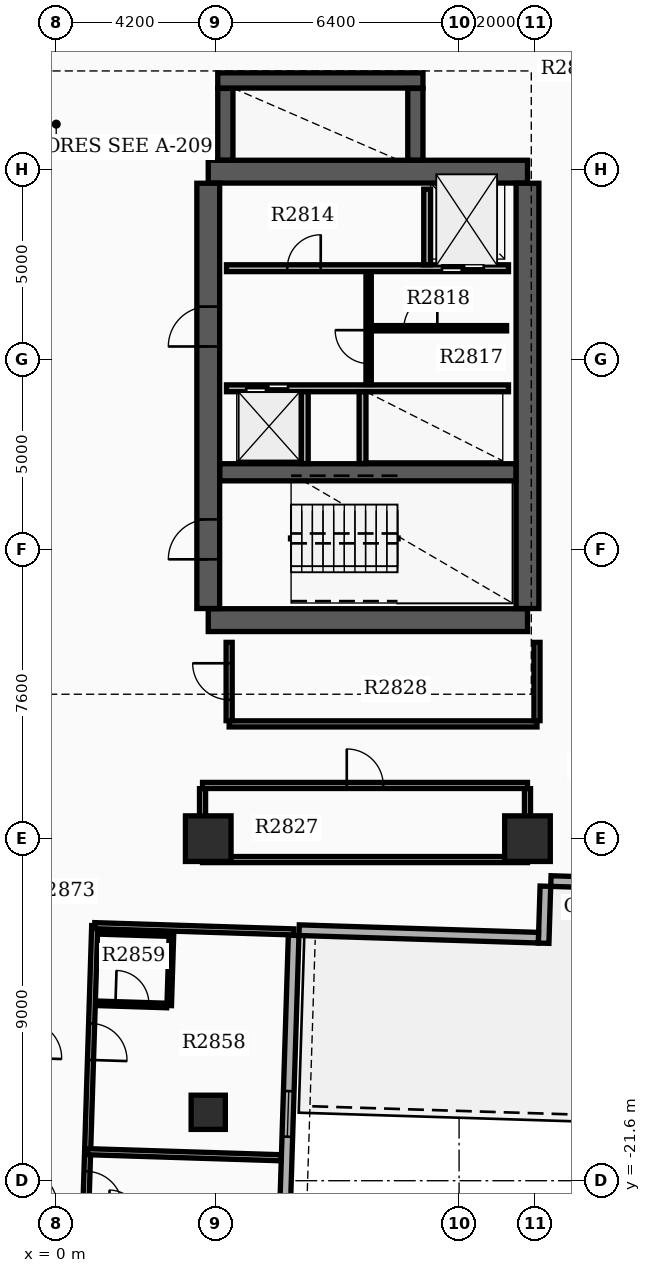
"""IFC4 building model, lengths in metres.
Left out: names, types, materials, properties, quantities, classifications, styles, units other than length and angle.
Written with IfcOpenShell. Run it as: python <this file> out.ifc"""

import sys

from ifc_helpers import new_model, si_unit, direction, frame, frame_2d, origin, origin_2d, place, context, subcontext, project, spatial, rectangle, extrude, element, fill, save


model = new_model("IFC4")
c1 = context("Model", 3, precision=1e-05, world=origin(), true_north=direction((0.0, 1.0)))
c2 = subcontext(c1, "Body", "Model", "MODEL_VIEW")
j1 = project(units=[si_unit("LENGTHUNIT", "METRE"), si_unit("PLANEANGLEUNIT", "RADIAN")], contexts=[c1])
p1 = place(None, origin())
s1 = spatial("IfcSite", under=j1, at=p1, CompositionType="ELEMENT")
p2 = place(p1, origin())
s2 = spatial("IfcBuilding", under=s1, at=p2, CompositionType="ELEMENT")
p3 = place(p2, frame((0.0, 0.0, 176.1)))
s3 = spatial("IfcBuildingStorey", under=s2, at=p3, CompositionType="ELEMENT", Elevation=176.1)
for number, where, z_axis, x_axis in (
    (1, (4.0, -6.85, 0.0), (0.0, 0.0, 1.0), (1.0, 0.0, 0.0)),
    (2, (4.0, 4.95, 0.0), (0.0, 0.0, 1.0), (1.0, 0.0, 0.0)),
):
    element("IfcWall", number, at=place(p3, frame(where, z_axis=z_axis, x_axis=x_axis)), inside=s3, PredefinedType="SHEAR", context=c2, shape_type="SweptSolid", body=[
        extrude(rectangle(XDim=8.4, YDim=0.6, at=frame_2d((4.2, 0.0))), origin(), (0.0, 0.0, 1.0), 3.7),
    ])
p4 = place(p3, frame((4.0, -6.545, 0.0), z_axis=(0.0, 0.0, 1.0), x_axis=(0.0, 1.0, 0.0)))
e3 = element("IfcWall", 3, at=p4, inside=s3, PredefinedType="SHEAR", context=c2, shape_type="SweptSolid", body=[
    extrude(rectangle(XDim=11.19, YDim=0.6, at=frame_2d((5.595, 0.0))), origin(), (0.0, 0.0, 1.0), 3.7),
])
p5 = place(p4, frame((1.295, 0.0, 0.0)))
e4 = element("IfcOpeningElement", 4, at=p5, cuts=e3, PredefinedType="OPENING", context=c2, shape_type="SweptSolid", body=[
    extrude(rectangle(XDim=1.05, YDim=2.15, at=frame_2d((0.525, 1.075))), frame((0.0, 0.31, 0.0), z_axis=(0.0, -1.0, 0.0), x_axis=(1.0, 0.0, 0.0)), (0.0, 0.0, 1.0), 0.62),
])
p6 = place(p4, frame((6.895, 0.0, 0.0)))
e5 = element("IfcOpeningElement", 5, at=p6, cuts=e3, PredefinedType="OPENING", context=c2, shape_type="SweptSolid", body=[
    extrude(rectangle(XDim=1.05, YDim=2.15, at=frame_2d((0.525, 1.075))), frame((0.0, 0.31, 0.0), z_axis=(0.0, -1.0, 0.0), x_axis=(1.0, 0.0, 0.0)), (0.0, 0.0, 1.0), 0.62),
])
p7 = place(p3, frame((12.4, -6.545, 0.0), z_axis=(0.0, 0.0, 1.0), x_axis=(0.0, 1.0, 0.0)))
e6 = element("IfcWall", 6, at=p7, inside=s3, PredefinedType="SHEAR", context=c2, shape_type="SweptSolid", body=[
    extrude(rectangle(XDim=11.19, YDim=0.6, at=frame_2d((5.595, 0.0))), origin(), (0.0, 0.0, 1.0), 3.7),
])
p8 = place(p3, frame((4.305, -2.96, 0.0), z_axis=(0.0, 0.0, 1.0), x_axis=(1.0, 0.0, 0.0)))
e7 = element("IfcWall", 7, at=p8, inside=s3, PredefinedType="SHEAR", context=c2, shape_type="SweptSolid", body=[
    extrude(rectangle(XDim=7.79, YDim=0.45, at=frame_2d((3.895, 0.0))), origin(), (0.0, 0.0, 1.0), 3.7),
])
p9 = place(p3, frame((4.45, 5.255, 0.0), z_axis=(0.0, 0.0, 1.0), x_axis=(0.0, 1.0, 0.0)))
e8 = element("IfcWall", 8, at=p9, inside=s3, PredefinedType="SHEAR", context=c2, shape_type="SweptSolid", body=[
    extrude(rectangle(XDim=1.885, YDim=0.4, at=frame_2d((0.942, 0.0))), origin(), (0.0, 0.0, 1.0), 3.7),
])
p10 = place(p3, frame((4.25, 7.35, 0.0), z_axis=(0.0, 0.0, 1.0), x_axis=(1.0, 0.0, 0.0)))
e9 = element("IfcWall", 9, at=p10, inside=s3, PredefinedType="SHEAR", context=c2, shape_type="SweptSolid", body=[
    extrude(rectangle(XDim=5.4, YDim=0.4, at=frame_2d((2.7, 0.0))), origin(), (0.0, 0.0, 1.0), 3.7),
])
p11 = place(p3, frame((9.45, 5.255, 0.0), z_axis=(0.0, 0.0, 1.0), x_axis=(0.0, 1.0, 0.0)))
e10 = element("IfcWall", 10, at=p11, inside=s3, PredefinedType="SHEAR", context=c2, shape_type="SweptSolid", body=[
    extrude(rectangle(XDim=1.885, YDim=0.4, at=frame_2d((0.942, 0.0))), origin(), (0.0, 0.0, 1.0), 3.7),
])
for number, where, z_axis, x_axis in (
    (11, (12.4, -12.6, 0.0), (0.0, 0.0, 1.0), (1.0, 0.0, 0.0)),
    (12, (4.0, -12.6, 0.0), (0.0, 0.0, 1.0), (1.0, 0.0, 0.0)),
):
    element("IfcColumn", number, at=place(p3, frame(where, z_axis=z_axis, x_axis=x_axis)), inside=s3, PredefinedType="COLUMN", context=c2, shape_type="SweptSolid", body=[
        extrude(rectangle(XDim=1.2, YDim=1.2, at=origin_2d()), origin(), (0.0, 0.0, 1.0), 3.9),
    ])
p12 = place(p3, frame((4.0, -19.8, 0.0), z_axis=(0.0, 0.0, 1.0), x_axis=(1.0, 0.0, 0.0)))
e13 = element("IfcColumn", 13, at=p12, inside=s3, PredefinedType="COLUMN", context=c2, shape_type="SweptSolid", body=[
    extrude(rectangle(XDim=0.9, YDim=0.9, at=origin_2d()), origin(), (0.0, 0.0, 1.0), 3.9),
])
p13 = place(p3, frame((5.616, -35.234, 0.0), z_axis=(0.0, 0.0, 1.0), x_axis=(0.031398187845, 0.999506955354, 0.0)))
e14 = element("IfcWall", 14, at=p13, inside=s3, PredefinedType="STANDARD", context=c2, shape_type="SweptSolid", body=[
    extrude(rectangle(XDim=20.1, YDim=0.28, at=frame_2d((10.05, 0.0))), origin(), (0.0, 0.0, 1.0), 2.97),
])
p14 = place(p13, frame((0.85, 0.0, 0.8)))
e15 = element("IfcOpeningElement", 15, at=p14, cuts=e14, PredefinedType="OPENING", context=c2, shape_type="SweptSolid", body=[
    extrude(rectangle(XDim=1.4, YDim=1.6, at=frame_2d((0.7, 0.8))), frame((0.0, 0.15, 0.0), z_axis=(0.0, -1.0, 0.0), x_axis=(1.0, 0.0, 0.0)), (0.0, 0.0, 1.0), 0.3),
])
p15 = place(p13, frame((4.05, 0.0, 0.8)))
e16 = element("IfcOpeningElement", 16, at=p15, cuts=e14, PredefinedType="OPENING", context=c2, shape_type="SweptSolid", body=[
    extrude(rectangle(XDim=1.4, YDim=1.6, at=frame_2d((0.7, 0.8))), frame((0.0, 0.15, 0.0), z_axis=(0.0, -1.0, 0.0), x_axis=(1.0, 0.0, 0.0)), (0.0, 0.0, 1.0), 0.3),
])
p16 = place(p13, frame((7.25, 0.0, 0.8)))
e17 = element("IfcOpeningElement", 17, at=p16, cuts=e14, PredefinedType="OPENING", context=c2, shape_type="SweptSolid", body=[
    extrude(rectangle(XDim=1.4, YDim=1.6, at=frame_2d((0.7, 0.8))), frame((0.0, 0.15, 0.0), z_axis=(0.0, -1.0, 0.0), x_axis=(1.0, 0.0, 0.0)), (0.0, 0.0, 1.0), 0.3),
])
p17 = place(p13, frame((10.95, 0.0, 0.8)))
e18 = element("IfcOpeningElement", 18, at=p17, cuts=e14, PredefinedType="OPENING", context=c2, shape_type="SweptSolid", body=[
    extrude(rectangle(XDim=1.4, YDim=1.6, at=frame_2d((0.7, 0.8))), frame((0.0, 0.15, 0.0), z_axis=(0.0, -1.0, 0.0), x_axis=(1.0, 0.0, 0.0)), (0.0, 0.0, 1.0), 0.3),
])
p18 = place(p13, frame((14.799, 0.0, 0.85)))
e19 = element("IfcOpeningElement", 19, at=p18, cuts=e14, PredefinedType="OPENING", context=c2, shape_type="SweptSolid", body=[
    extrude(rectangle(XDim=1.2, YDim=1.6, at=frame_2d((0.6, 0.8))), frame((0.0, 0.15, 0.0), z_axis=(0.0, -1.0, 0.0), x_axis=(1.0, 0.0, 0.0)), (0.0, 0.0, 1.0), 0.3),
])
p19 = place(p3, frame((14.235, -13.754, 0.0), z_axis=(0.0, 0.0, 1.0), x_axis=(-0.999506398264, 0.031415916822, 0.0)))
e20 = element("IfcWall", 20, at=p19, inside=s3, PredefinedType="STANDARD", context=c2, shape_type="SweptSolid", body=[
    extrude(rectangle(XDim=1.22, YDim=0.28, at=frame_2d((0.61, 0.0))), origin(), (0.0, 0.0, 1.0), 2.97),
])
p20 = place(p3, frame((12.871, -13.851, 0.0), z_axis=(0.0, 0.0, 1.0), x_axis=(-0.031412596484, -0.999506502621, 0.0)))
e21 = element("IfcWall", 21, at=p20, inside=s3, PredefinedType="STANDARD", context=c2, shape_type="SweptSolid", body=[
    extrude(rectangle(XDim=1.5, YDim=0.28, at=frame_2d((0.75, 0.0))), origin(), (0.0, 0.0, 1.0), 2.97),
])
p21 = place(p3, frame((12.689, -15.206, 0.0), z_axis=(0.0, 0.0, 1.0), x_axis=(-0.999507262922, 0.031388395416, 0.0)))
e22 = element("IfcWall", 22, at=p21, inside=s3, PredefinedType="STANDARD", context=c2, shape_type="SweptSolid", body=[
    extrude(rectangle(XDim=6.3, YDim=0.28, at=frame_2d((3.15, 0.0))), origin(), (0.0, 0.0, 1.0), 2.97),
])
p22 = place(p3, frame((4.48, 2.41, 0.0), z_axis=(0.0, 0.0, 1.0), x_axis=(1.0, 0.0, 0.0)))
e23 = element("IfcWall", 23, at=p22, inside=s3, PredefinedType="SOLIDWALL", context=c2, shape_type="SweptSolid", body=[
    extrude(rectangle(XDim=7.42, YDim=0.18, at=frame_2d((3.71, 0.0))), origin(), (0.0, 0.0, 1.0), 2.96),
])
p23 = place(p22, frame((5.67, 0.0, 0.0)))
e24 = element("IfcOpeningElement", 24, at=p23, cuts=e23, PredefinedType="OPENING", context=c2, shape_type="SweptSolid", body=[
    extrude(rectangle(XDim=1.1, YDim=2.15, at=frame_2d((0.55, 1.075))), frame((0.0, 0.1, 0.0), z_axis=(0.0, -1.0, 0.0), x_axis=(1.0, 0.0, 0.0)), (0.0, 0.0, 1.0), 0.2),
])
p24 = place(p22, frame((1.6, 0.0, 0.0)))
e25 = element("IfcOpeningElement", 25, at=p24, cuts=e23, PredefinedType="OPENING", context=c2, shape_type="SweptSolid", body=[
    extrude(rectangle(XDim=0.88, YDim=2.1, at=frame_2d((0.44, 1.05))), frame((0.0, 0.1, 0.0), z_axis=(0.0, -1.0, 0.0), x_axis=(1.0, 0.0, 0.0)), (0.0, 0.0, 1.0), 0.2),
])
p25 = place(p3, frame((4.48, -0.75, 0.0), z_axis=(0.0, 0.0, 1.0), x_axis=(1.0, 0.0, 0.0)))
e26 = element("IfcWall", 26, at=p25, inside=s3, PredefinedType="SOLIDWALL", context=c2, shape_type="SweptSolid", body=[
    extrude(rectangle(XDim=7.42, YDim=0.18, at=frame_2d((3.71, 0.0))), origin(), (0.0, 0.0, 1.0), 2.96),
])
p26 = place(p25, frame((0.52, 0.0, 0.0)))
e27 = element("IfcOpeningElement", 27, at=p26, cuts=e26, PredefinedType="OPENING", context=c2, shape_type="SweptSolid", body=[
    extrude(rectangle(XDim=1.1, YDim=2.15, at=frame_2d((0.55, 1.075))), frame((0.0, 0.1, 0.0), z_axis=(0.0, -1.0, 0.0), x_axis=(1.0, 0.0, 0.0)), (0.0, 0.0, 1.0), 0.2),
])
p27 = place(p3, frame((9.76, 2.5, 0.0), z_axis=(0.0, 0.0, 1.0), x_axis=(0.0, 1.0, 0.0)))
e28 = element("IfcWall", 28, at=p27, inside=s3, PredefinedType="SOLIDWALL", context=c2, shape_type="SweptSolid", body=[
    extrude(rectangle(XDim=1.99, YDim=0.18, at=frame_2d((0.995, 0.0))), origin(), (0.0, 0.0, 1.0), 2.96),
])
for number, where, z_axis, x_axis in (
    (29, (6.54, -2.73, 0.0), (0.0, 0.0, 1.0), (0.0, 1.0, 0.0)),
    (30, (8.06, -2.73, 0.0), (0.0, 0.0, 1.0), (0.0, 1.0, 0.0)),
):
    element("IfcWall", number, at=place(p3, frame(where, z_axis=z_axis, x_axis=x_axis)), inside=s3, PredefinedType="SOLIDWALL", context=c2, shape_type="SweptSolid", body=[
        extrude(rectangle(XDim=1.89, YDim=0.18, at=frame_2d((0.945, 0.0))), origin(), (0.0, 0.0, 1.0), 2.96),
    ])
p28 = place(p3, frame((8.22, -0.65, 0.0), z_axis=(0.0, 0.0, 1.0), x_axis=(0.0, 1.0, 0.0)))
e31 = element("IfcWall", 31, at=p28, inside=s3, PredefinedType="SOLIDWALL", context=c2, shape_type="SweptSolid", body=[
    extrude(rectangle(XDim=2.96, YDim=0.14, at=frame_2d((1.48, 0.0))), origin(), (0.0, 0.0, 1.0), 2.96),
])
p29 = place(p28, frame((0.55, 0.0, 0.0)))
e32 = element("IfcOpeningElement", 32, at=p29, cuts=e31, PredefinedType="OPENING", context=c2, shape_type="SweptSolid", body=[
    extrude(rectangle(XDim=0.88, YDim=2.1, at=frame_2d((0.44, 1.05))), frame((0.0, 0.08, 0.0), z_axis=(0.0, -1.0, 0.0), x_axis=(1.0, 0.0, 0.0)), (0.0, 0.0, 1.0), 0.16),
])
p30 = place(p3, frame((8.298, 0.83, 0.0), z_axis=(0.0, 0.0, 1.0), x_axis=(1.0, 0.0, 0.0)))
e33 = element("IfcWall", 33, at=p30, inside=s3, PredefinedType="PARTITIONING", context=c2, shape_type="SweptSolid", body=[
    extrude(rectangle(XDim=3.552, YDim=0.14, at=frame_2d((1.776, 0.0))), origin(), (0.0, 0.0, 1.0), 2.96),
])
p31 = place(p30, frame((0.85, 0.0, 0.0)))
e34 = element("IfcOpeningElement", 34, at=p31, cuts=e33, PredefinedType="OPENING", context=c2, shape_type="SweptSolid", body=[
    extrude(rectangle(XDim=0.88, YDim=2.1, at=frame_2d((0.44, 1.05))), frame((0.0, 0.08, 0.0), z_axis=(0.0, -1.0, 0.0), x_axis=(1.0, 0.0, 0.0)), (0.0, 0.0, 1.0), 0.16),
])
p32 = place(p3, frame((3.85, -13.15, 0.0), z_axis=(0.0, 0.0, 1.0), x_axis=(1.0, 0.0, 0.0)))
e35 = element("IfcWall", 35, at=p32, inside=s3, PredefinedType="PARTITIONING", context=c2, shape_type="SweptSolid", body=[
    extrude(rectangle(XDim=8.55, YDim=0.16, at=frame_2d((4.275, 0.0))), origin(), (0.0, 0.0, 1.0), 2.96),
])
p33 = place(p3, frame((3.85, -11.2, 0.0), z_axis=(0.0, 0.0, 1.0), x_axis=(1.0, 0.0, 0.0)))
e36 = element("IfcWall", 36, at=p33, inside=s3, PredefinedType="PARTITIONING", context=c2, shape_type="SweptSolid", body=[
    extrude(rectangle(XDim=8.55, YDim=0.16, at=frame_2d((4.275, 0.0))), origin(), (0.0, 0.0, 1.0), 2.96),
])
p34 = place(p33, frame((3.795, 0.0, 0.0)))
e37 = element("IfcOpeningElement", 37, at=p34, cuts=e36, PredefinedType="OPENING", context=c2, shape_type="SweptSolid", body=[
    extrude(rectangle(XDim=0.96, YDim=2.15, at=frame_2d((0.48, 1.075))), frame((0.0, 0.09, 0.0), z_axis=(0.0, -1.0, 0.0), x_axis=(1.0, 0.0, 0.0)), (0.0, 0.0, 1.0), 0.18),
])
for number, where, z_axis, x_axis in (
    (38, (3.85, -13.065, 0.0), (0.0, 0.0, 1.0), (0.0, 1.0, 0.0)),
    (39, (12.4, -13.065, 0.0), (0.0, 0.0, 1.0), (0.0, 1.0, 0.0)),
):
    element("IfcWall", number, at=place(p3, frame(where, z_axis=z_axis, x_axis=x_axis)), inside=s3, PredefinedType="PARTITIONING", context=c2, shape_type="SweptSolid", body=[
        extrude(rectangle(XDim=1.78, YDim=0.16, at=frame_2d((0.89, 0.0))), origin(), (0.0, 0.0, 1.0), 2.96),
    ])
p35 = place(p3, frame((4.55, -9.58, 0.0), z_axis=(0.0, 0.0, 1.0), x_axis=(1.0, 0.0, 0.0)))
e40 = element("IfcWall", 40, at=p35, inside=s3, PredefinedType="PARTITIONING", context=c2, shape_type="SweptSolid", body=[
    extrude(rectangle(XDim=8.1, YDim=0.16, at=frame_2d((4.05, 0.0))), origin(), (0.0, 0.0, 1.0), 2.96),
])
p36 = place(p3, frame((4.55, -9.495, 0.0), z_axis=(0.0, 0.0, 1.0), x_axis=(0.0, 1.0, 0.0)))
e41 = element("IfcWall", 41, at=p36, inside=s3, PredefinedType="PARTITIONING", context=c2, shape_type="SweptSolid", body=[
    extrude(rectangle(XDim=2.06, YDim=0.16, at=frame_2d((1.03, 0.0))), origin(), (0.0, 0.0, 1.0), 2.96),
])
p37 = place(p36, frame((0.55, 0.0, 0.0)))
e42 = element("IfcOpeningElement", 42, at=p37, cuts=e41, PredefinedType="OPENING", context=c2, shape_type="SweptSolid", body=[
    extrude(rectangle(XDim=0.96, YDim=2.15, at=frame_2d((0.48, 1.075))), frame((0.0, 0.09, 0.0), z_axis=(0.0, -1.0, 0.0), x_axis=(1.0, 0.0, 0.0)), (0.0, 0.0, 1.0), 0.18),
])
p38 = place(p3, frame((12.65, -9.495, 0.0), z_axis=(0.0, 0.0, 1.0), x_axis=(0.0, 1.0, 0.0)))
e43 = element("IfcWall", 43, at=p38, inside=s3, PredefinedType="PARTITIONING", context=c2, shape_type="SweptSolid", body=[
    extrude(rectangle(XDim=2.06, YDim=0.16, at=frame_2d((1.03, 0.0))), origin(), (0.0, 0.0, 1.0), 2.96),
])
p39 = place(p3, frame((1.013, -14.889, 0.0), z_axis=(0.0, 0.0, 1.0), x_axis=(-0.031410762168, -0.999506560269, 0.0)))
e44 = element("IfcWall", 44, at=p39, inside=s3, PredefinedType="PARTITIONING", context=c2, shape_type="SweptSolid", body=[
    extrude(rectangle(XDim=9.7, YDim=0.16, at=frame_2d((4.85, 0.0))), origin(), (0.0, 0.0, 1.0), 2.96),
])
p40 = place(p39, frame((2.575, 0.0, 0.0)))
e45 = element("IfcOpeningElement", 45, at=p40, cuts=e44, PredefinedType="OPENING", context=c2, shape_type="SweptSolid", body=[
    extrude(rectangle(XDim=0.96, YDim=2.15, at=frame_2d((0.48, 1.075))), frame((0.0, 0.09, 0.0), z_axis=(0.0, -1.0, 0.0), x_axis=(1.0, 0.0, 0.0)), (0.0, 0.0, 1.0), 0.18),
])
p41 = place(p39, frame((6.467, 0.0, 0.0)))
e46 = element("IfcOpeningElement", 46, at=p41, cuts=e44, PredefinedType="OPENING", context=c2, shape_type="SweptSolid", body=[
    extrude(rectangle(XDim=0.96, YDim=2.15, at=frame_2d((0.48, 1.075))), frame((0.0, 0.09, 0.0), z_axis=(0.0, -1.0, 0.0), x_axis=(1.0, 0.0, 0.0)), (0.0, 0.0, 1.0), 0.18),
])
p42 = place(p3, frame((1.013, -14.889, 0.0), z_axis=(0.0, 0.0, 1.0), x_axis=(0.999506834859, -0.031402023339, 0.0)))
e47 = element("IfcWall", 47, at=p42, inside=s3, PredefinedType="PARTITIONING", context=c2, shape_type="SweptSolid", body=[
    extrude(rectangle(XDim=5.24, YDim=0.16, at=frame_2d((2.62, 0.0))), origin(), (0.0, 0.0, 1.0), 2.96),
])
p43 = place(p3, frame((0.826, -20.836, 0.0), z_axis=(0.0, 0.0, 1.0), x_axis=(0.999506728859, -0.031405397074, 0.0)))
e48 = element("IfcWall", 48, at=p43, inside=s3, PredefinedType="PARTITIONING", context=c2, shape_type="SweptSolid", body=[
    extrude(rectangle(XDim=5.092, YDim=0.16, at=frame_2d((2.546, 0.0))), origin(), (0.0, 0.0, 1.0), 2.96),
])
p44 = place(p3, frame((1.089, -16.933, 0.0), z_axis=(0.0, 0.0, 1.0), x_axis=(0.999507221803, -0.031389704724, 0.0)))
e49 = element("IfcWall", 49, at=p44, inside=s3, PredefinedType="PARTITIONING", context=c2, shape_type="SweptSolid", body=[
    extrude(rectangle(XDim=1.82, YDim=0.12, at=frame_2d((0.91, 0.0))), origin(), (0.0, 0.0, 1.0), 2.96),
])
p45 = place(p44, frame((0.47, 0.0, 0.0)))
e50 = element("IfcOpeningElement", 50, at=p45, cuts=e49, PredefinedType="OPENING", context=c2, shape_type="SweptSolid", body=[
    extrude(rectangle(XDim=0.88, YDim=2.1, at=frame_2d((0.44, 1.05))), frame((0.0, 0.07, 0.0), z_axis=(0.0, -1.0, 0.0), x_axis=(1.0, 0.0, 0.0)), (0.0, 0.0, 1.0), 0.14),
])
p46 = place(p3, frame((1.148, -15.053, 0.0), z_axis=(0.0, 0.0, 1.0), x_axis=(0.999507221803, -0.031389704724, 0.0)))
e51 = element("IfcWall", 51, at=p46, inside=s3, PredefinedType="PARTITIONING", context=c2, shape_type="SweptSolid", body=[
    extrude(rectangle(XDim=1.82, YDim=0.12, at=frame_2d((0.91, 0.0))), origin(), (0.0, 0.0, 1.0), 2.96),
])
p47 = place(p3, frame((3.032, -15.113, 0.0), z_axis=(0.0, 0.0, 1.0), x_axis=(-0.031429371883, -0.999505975261, 0.0)))
e52 = element("IfcWall", 52, at=p47, inside=s3, PredefinedType="PARTITIONING", context=c2, shape_type="SweptSolid", body=[
    extrude(rectangle(XDim=1.88, YDim=0.12, at=frame_2d((0.94, 0.0))), origin(), (0.0, 0.0, 1.0), 2.96),
])
p48 = place(p18, origin())
e53 = element("IfcWindow", 53, at=p48, inside=s3, PartitioningType="SINGLE_PANEL", PredefinedType="WINDOW", context=c2, shape_type="SweptSolid", body=[
    extrude(rectangle(XDim=1.2, YDim=1.6, at=frame_2d((0.6, 0.8))), frame((0.0, 0.03, 0.0), z_axis=(0.0, -1.0, 0.0), x_axis=(1.0, 0.0, 0.0)), (0.0, 0.0, 1.0), 0.06),
])
fill(e19, e53)
p49 = place(p5, origin())
e54 = element("IfcDoor", 54, at=p49, inside=s3, OperationType="SINGLE_SWING_LEFT", PredefinedType="DOOR", context=c2, shape_type="SweptSolid", body=[
    extrude(rectangle(XDim=1.05, YDim=2.15, at=frame_2d((0.525, 1.075))), frame((0.0, 0.025, 0.0), z_axis=(0.0, -1.0, 0.0), x_axis=(1.0, 0.0, 0.0)), (0.0, 0.0, 1.0), 0.05),
])
fill(e4, e54)
p50 = place(p6, origin())
e55 = element("IfcDoor", 55, at=p50, inside=s3, OperationType="SINGLE_SWING_LEFT", PredefinedType="DOOR", context=c2, shape_type="SweptSolid", body=[
    extrude(rectangle(XDim=1.05, YDim=2.15, at=frame_2d((0.525, 1.075))), frame((0.0, 0.025, 0.0), z_axis=(0.0, -1.0, 0.0), x_axis=(1.0, 0.0, 0.0)), (0.0, 0.0, 1.0), 0.05),
])
fill(e5, e55)
p51 = place(p23, origin())
e56 = element("IfcDoor", 56, at=p51, inside=s3, OperationType="DOUBLE_DOOR_SLIDING", PredefinedType="DOOR", context=c2, shape_type="SweptSolid", body=[
    extrude(rectangle(XDim=1.1, YDim=2.15, at=frame_2d((0.55, 1.075))), frame((0.0, 0.025, 0.0), z_axis=(0.0, -1.0, 0.0), x_axis=(1.0, 0.0, 0.0)), (0.0, 0.0, 1.0), 0.05),
])
fill(e24, e56)
p52 = place(p26, origin())
e57 = element("IfcDoor", 57, at=p52, inside=s3, OperationType="DOUBLE_DOOR_SLIDING", PredefinedType="DOOR", context=c2, shape_type="SweptSolid", body=[
    extrude(rectangle(XDim=1.1, YDim=2.15, at=frame_2d((0.55, 1.075))), frame((0.0, 0.025, 0.0), z_axis=(0.0, -1.0, 0.0), x_axis=(1.0, 0.0, 0.0)), (0.0, 0.0, 1.0), 0.05),
])
fill(e27, e57)
p53 = place(p24, origin())
e58 = element("IfcDoor", 58, at=p53, inside=s3, OperationType="SINGLE_SWING_RIGHT", PredefinedType="DOOR", context=c2, shape_type="SweptSolid", body=[
    extrude(rectangle(XDim=0.88, YDim=2.1, at=frame_2d((0.44, 1.05))), frame((0.0, 0.025, 0.0), z_axis=(0.0, -1.0, 0.0), x_axis=(1.0, 0.0, 0.0)), (0.0, 0.0, 1.0), 0.05),
])
fill(e25, e58)
p54 = place(p29, origin())
e59 = element("IfcDoor", 59, at=p54, inside=s3, OperationType="SINGLE_SWING_RIGHT", PredefinedType="DOOR", context=c2, shape_type="SweptSolid", body=[
    extrude(rectangle(XDim=0.88, YDim=2.1, at=frame_2d((0.44, 1.05))), frame((0.0, 0.025, 0.0), z_axis=(0.0, -1.0, 0.0), x_axis=(1.0, 0.0, 0.0)), (0.0, 0.0, 1.0), 0.05),
])
fill(e32, e59)
p55 = place(p31, origin())
e60 = element("IfcDoor", 60, at=p55, inside=s3, OperationType="SINGLE_SWING_RIGHT", PredefinedType="DOOR", context=c2, shape_type="SweptSolid", body=[
    extrude(rectangle(XDim=0.88, YDim=2.1, at=frame_2d((0.44, 1.05))), frame((0.0, 0.025, 0.0), z_axis=(0.0, -1.0, 0.0), x_axis=(1.0, 0.0, 0.0)), (0.0, 0.0, 1.0), 0.05),
])
fill(e34, e60)
p56 = place(p34, origin())
e61 = element("IfcDoor", 61, at=p56, inside=s3, OperationType="SINGLE_SWING_LEFT", PredefinedType="DOOR", context=c2, shape_type="SweptSolid", body=[
    extrude(rectangle(XDim=0.96, YDim=2.15, at=frame_2d((0.48, 1.075))), frame((0.0, 0.025, 0.0), z_axis=(0.0, -1.0, 0.0), x_axis=(1.0, 0.0, 0.0)), (0.0, 0.0, 1.0), 0.05),
])
fill(e37, e61)
p57 = place(p37, origin())
e62 = element("IfcDoor", 62, at=p57, inside=s3, OperationType="SINGLE_SWING_RIGHT", PredefinedType="DOOR", context=c2, shape_type="SweptSolid", body=[
    extrude(rectangle(XDim=0.96, YDim=2.15, at=frame_2d((0.48, 1.075))), frame((0.0, 0.025, 0.0), z_axis=(0.0, -1.0, 0.0), x_axis=(1.0, 0.0, 0.0)), (0.0, 0.0, 1.0), 0.05),
])
fill(e42, e62)
p58 = place(p40, origin())
e63 = element("IfcDoor", 63, at=p58, inside=s3, OperationType="SINGLE_SWING_RIGHT", PredefinedType="DOOR", context=c2, shape_type="SweptSolid", body=[
    extrude(rectangle(XDim=0.96, YDim=2.15, at=frame_2d((0.48, 1.075))), frame((0.0, 0.025, 0.0), z_axis=(0.0, -1.0, 0.0), x_axis=(1.0, 0.0, 0.0)), (0.0, 0.0, 1.0), 0.05),
])
fill(e45, e63)
p59 = place(p45, origin())
e64 = element("IfcDoor", 64, at=p59, inside=s3, OperationType="SINGLE_SWING_LEFT", PredefinedType="DOOR", context=c2, shape_type="SweptSolid", body=[
    extrude(rectangle(XDim=0.88, YDim=2.1, at=frame_2d((0.44, 1.05))), frame((0.0, 0.025, 0.0), z_axis=(0.0, -1.0, 0.0), x_axis=(1.0, 0.0, 0.0)), (0.0, 0.0, 1.0), 0.05),
])
fill(e50, e64)
p60 = place(p41, origin())
e65 = element("IfcDoor", 65, at=p60, inside=s3, OperationType="SINGLE_SWING_RIGHT", PredefinedType="DOOR", context=c2, shape_type="SweptSolid", body=[
    extrude(rectangle(XDim=0.96, YDim=2.15, at=frame_2d((0.48, 1.075))), frame((0.0, 0.025, 0.0), z_axis=(0.0, -1.0, 0.0), x_axis=(1.0, 0.0, 0.0)), (0.0, 0.0, 1.0), 0.05),
])
fill(e46, e65)
save(model, sys.argv[1])
